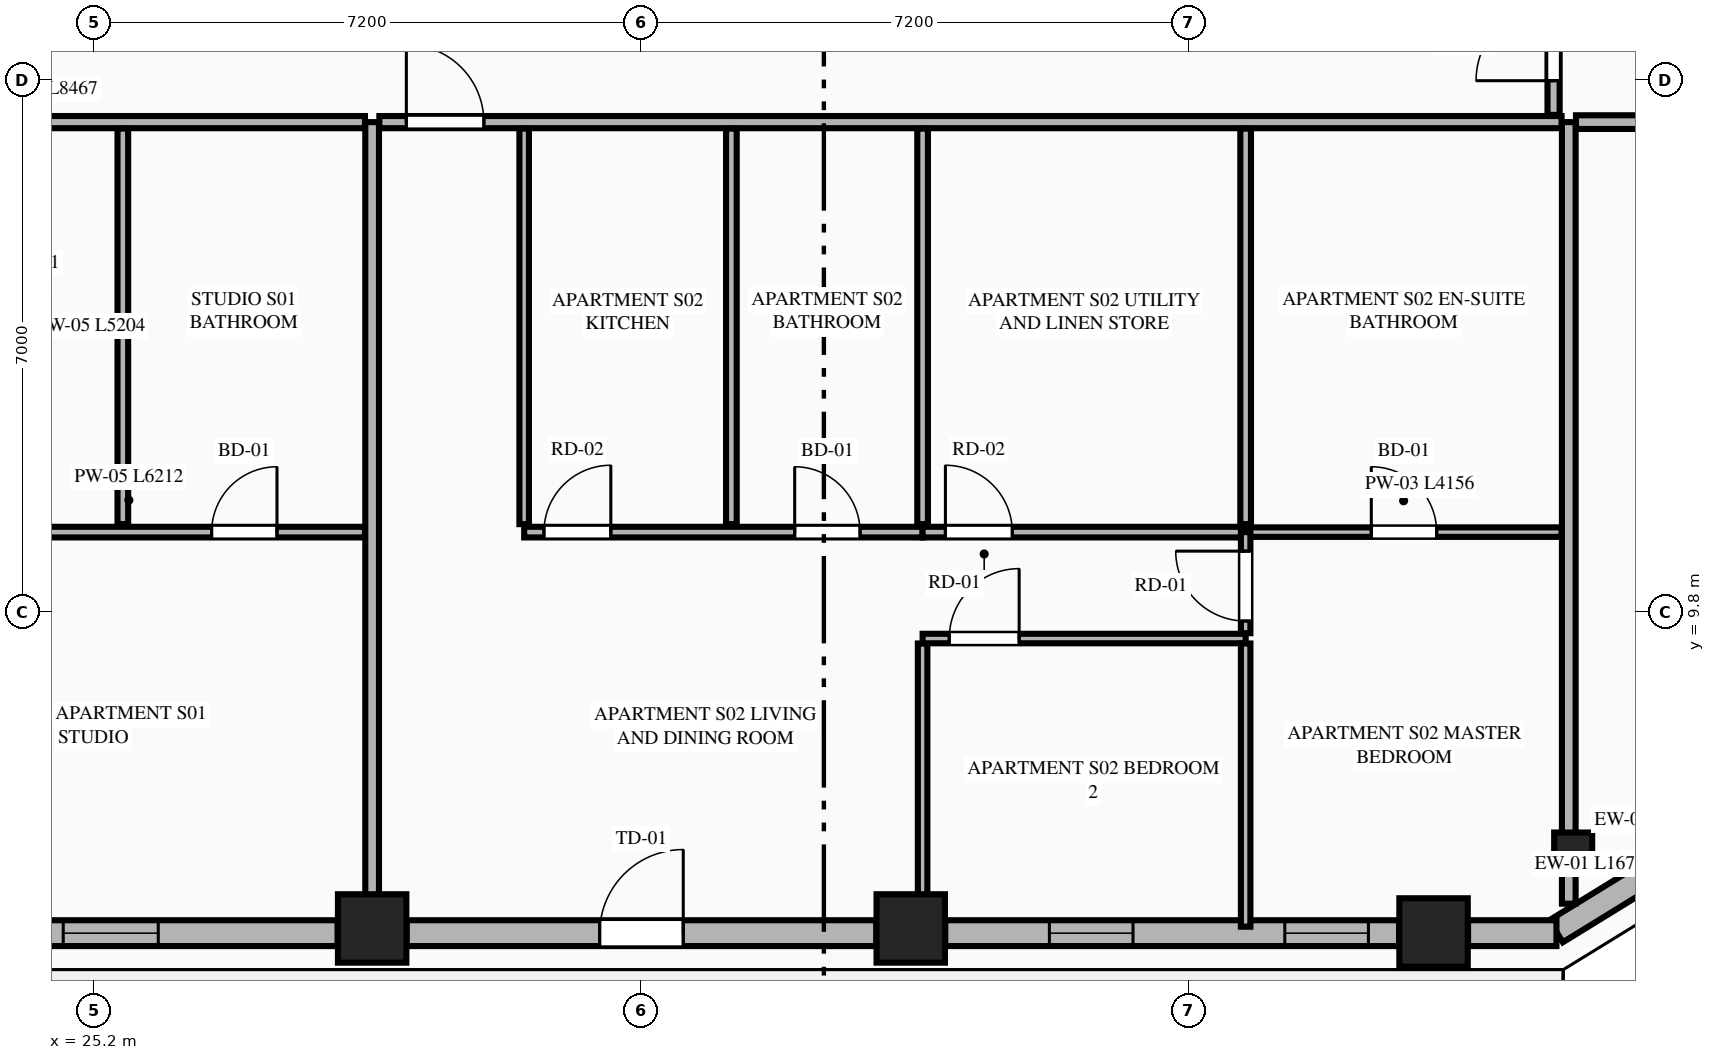
"""IFC4 building model, lengths in metres.
Left out: names, types, materials, properties, quantities, classifications, styles, units other than length and angle.
Written with IfcOpenShell. Run it as: python <this file> out.ifc"""

import sys

from ifc_helpers import new_model, si_unit, direction, frame, frame_2d, origin, origin_2d, place, context, subcontext, project, spatial, rectangle, extrude, element, fill, save


model = new_model("IFC4")
c1 = context("Model", 3, precision=1e-05, world=origin(), true_north=direction((0.0, 1.0)))
c2 = subcontext(c1, "Body", "Model", "MODEL_VIEW")
j1 = project(units=[si_unit("LENGTHUNIT", "METRE"), si_unit("PLANEANGLEUNIT", "RADIAN")], contexts=[c1])
p1 = place(None, origin())
s1 = spatial("IfcSite", under=j1, at=p1, CompositionType="ELEMENT")
p2 = place(p1, origin())
s2 = spatial("IfcBuilding", under=s1, at=p2, CompositionType="ELEMENT")
p3 = place(p2, frame((0.0, 0.0, 179.0)))
s3 = spatial("IfcBuildingStorey", under=s2, at=p3, CompositionType="ELEMENT", Elevation=179.0)
for number, where, z_axis, x_axis in (
    (1, (28.857, 5.642, 0.0), (0.0, 0.0, 1.0), (1.0, 0.0, 0.0)),
    (2, (35.943, 5.642, 0.0), (0.0, 0.0, 1.0), (1.0, 0.0, 0.0)),
    (3, (42.821, 5.589, 0.0), (0.0, 0.0, 1.0), (1.0, 0.0, 0.0)),
):
    element("IfcColumn", number, at=place(p3, frame(where, z_axis=z_axis, x_axis=x_axis)), inside=s3, PredefinedType="COLUMN", context=c2, shape_type="SweptSolid", body=[
        extrude(rectangle(XDim=0.9, YDim=0.9, at=origin_2d()), origin(), (0.0, 0.0, 1.0), 3.55),
    ])
p4 = place(p3, frame((44.658, 6.654, 0.0), z_axis=(0.0, 0.0, 1.0), x_axis=(0.865230187018, 0.501374833306, 0.0)))
e4 = element("IfcColumn", 4, at=p4, inside=s3, PredefinedType="PILASTER", context=c2, shape_type="SweptSolid", body=[
    extrude(rectangle(XDim=0.5, YDim=0.35, at=origin_2d()), origin(), (0.0, 0.0, 1.0), 3.55),
])
p5 = place(p3, frame((44.433, 5.605, 0.0), z_axis=(0.0, 0.0, 1.0), x_axis=(0.851778214877, 0.523902541185, 0.0)))
e5 = element("IfcWall", 5, at=p5, inside=s3, PredefinedType="STANDARD", context=c2, shape_type="SweptSolid", body=[
    extrude(rectangle(XDim=1.678, YDim=0.34, at=frame_2d((0.839, 0.0))), origin(), (0.0, 0.0, 1.0), 3.35),
])
p6 = place(p3, frame((22.433, 5.58, 0.0), z_axis=(0.0, 0.0, 1.0), x_axis=(1.0, 0.0, 0.0)))
e6 = element("IfcWall", 6, at=p6, inside=s3, PredefinedType="STANDARD", context=c2, shape_type="SweptSolid", body=[
    extrude(rectangle(XDim=5.97, YDim=0.34, at=frame_2d((2.985, 0.0))), origin(), (0.0, 0.0, 1.0), 2.883),
])
p7 = place(p6, frame((2.36, 0.0, 0.75)))
e7 = element("IfcOpeningElement", 7, at=p7, cuts=e6, PredefinedType="OPENING", context=c2, shape_type="SweptSolid", body=[
    extrude(rectangle(XDim=1.25, YDim=1.95, at=frame_2d((0.625, 0.975))), frame((0.0, 0.18, 0.0), z_axis=(0.0, -1.0, 0.0), x_axis=(1.0, 0.0, 0.0)), (0.0, 0.0, 1.0), 0.36),
])
p8 = place(p3, frame((29.311, 5.58, 0.0), z_axis=(0.0, 0.0, 1.0), x_axis=(1.0, 0.0, 0.0)))
e8 = element("IfcWall", 8, at=p8, inside=s3, PredefinedType="STANDARD", context=c2, shape_type="SweptSolid", body=[
    extrude(rectangle(XDim=6.178, YDim=0.34, at=frame_2d((3.089, 0.0))), origin(), (0.0, 0.0, 1.0), 2.883),
])
p9 = place(p8, frame((2.539, 0.0, 0.0)))
e9 = element("IfcOpeningElement", 9, at=p9, cuts=e8, PredefinedType="OPENING", context=c2, shape_type="SweptSolid", body=[
    extrude(rectangle(XDim=1.1, YDim=2.25, at=frame_2d((0.55, 1.125))), frame((0.0, 0.18, 0.0), z_axis=(0.0, -1.0, 0.0), x_axis=(1.0, 0.0, 0.0)), (0.0, 0.0, 1.0), 0.36),
])
p10 = place(p3, frame((36.397, 5.58, 0.0), z_axis=(0.0, 0.0, 1.0), x_axis=(1.0, 0.0, 0.0)))
e10 = element("IfcWall", 10, at=p10, inside=s3, PredefinedType="STANDARD", context=c2, shape_type="SweptSolid", body=[
    extrude(rectangle(XDim=5.97, YDim=0.34, at=frame_2d((2.985, 0.0))), origin(), (0.0, 0.0, 1.0), 2.883),
])
p11 = place(p10, frame((1.37, 0.0, 0.75)))
e11 = element("IfcOpeningElement", 11, at=p11, cuts=e10, PredefinedType="OPENING", context=c2, shape_type="SweptSolid", body=[
    extrude(rectangle(XDim=1.1, YDim=1.983, at=frame_2d((0.55, 0.991))), frame((0.0, 0.18, 0.0), z_axis=(0.0, -1.0, 0.0), x_axis=(1.0, 0.0, 0.0)), (0.0, 0.0, 1.0), 0.36),
])
p12 = place(p10, frame((4.467, 0.0, 0.75)))
e12 = element("IfcOpeningElement", 12, at=p12, cuts=e10, PredefinedType="OPENING", context=c2, shape_type="SweptSolid", body=[
    extrude(rectangle(XDim=1.1, YDim=1.983, at=frame_2d((0.55, 0.991))), frame((0.0, 0.18, 0.0), z_axis=(0.0, -1.0, 0.0), x_axis=(1.0, 0.0, 0.0)), (0.0, 0.0, 1.0), 0.36),
])
p13 = place(p3, frame((43.275, 5.58, 0.0), z_axis=(0.0, 0.0, 1.0), x_axis=(1.0, 0.0, 0.0)))
e13 = element("IfcWall", 13, at=p13, inside=s3, PredefinedType="STANDARD", context=c2, shape_type="SweptSolid", body=[
    extrude(rectangle(XDim=1.163, YDim=0.34, at=frame_2d((0.582, 0.0))), origin(), (0.0, 0.0, 1.0), 3.35),
])
p14 = place(p3, frame((28.857, 5.755, 0.0), z_axis=(0.0, 0.0, 1.0), x_axis=(0.0, 1.0, 0.0)))
e14 = element("IfcWall", 14, at=p14, inside=s3, PredefinedType="PARTITIONING", context=c2, shape_type="SweptSolid", body=[
    extrude(rectangle(XDim=10.495, YDim=0.18, at=frame_2d((5.248, 0.0))), origin(), (0.0, 0.0, 1.0), 2.807),
])
p15 = place(p3, frame((44.6, 5.968, 0.0), z_axis=(0.0, 0.0, 1.0), x_axis=(0.0, 1.0, 0.0)))
e15 = element("IfcWall", 15, at=p15, inside=s3, PredefinedType="PARTITIONING", context=c2, shape_type="SweptSolid", body=[
    extrude(rectangle(XDim=10.282, YDim=0.18, at=frame_2d((5.141, 0.0))), origin(), (0.0, 0.0, 1.0), 3.35),
])
p16 = place(p3, frame((20.295, 16.25, 0.0), z_axis=(0.0, 0.0, 1.0), x_axis=(1.0, 0.0, 0.0)))
e16 = element("IfcWall", 16, at=p16, inside=s3, PredefinedType="PARTITIONING", context=c2, shape_type="SweptSolid", body=[
    extrude(rectangle(XDim=8.467, YDim=0.16, at=frame_2d((4.233, 0.0))), origin(), (0.0, 0.0, 1.0), 3.35),
])
p17 = place(p16, frame((0.705, 0.0, 0.0)))
e17 = element("IfcOpeningElement", 17, at=p17, cuts=e16, PredefinedType="OPENING", context=c2, shape_type="SweptSolid", body=[
    extrude(rectangle(XDim=1.02, YDim=2.25, at=frame_2d((0.51, 1.125))), frame((0.0, 0.09, 0.0), z_axis=(0.0, -1.0, 0.0), x_axis=(1.0, 0.0, 0.0)), (0.0, 0.0, 1.0), 0.18),
])
p18 = place(p3, frame((22.55, 10.856, 0.0), z_axis=(0.0, 0.0, 1.0), x_axis=(1.0, 0.0, 0.0)))
e18 = element("IfcWall", 18, at=p18, inside=s3, PredefinedType="PLUMBINGWALL", context=c2, shape_type="SweptSolid", body=[
    extrude(rectangle(XDim=6.212, YDim=0.14, at=frame_2d((3.106, 0.0))), origin(), (0.0, 0.0, 1.0), 3.35),
])
p19 = place(p18, frame((4.195, 0.0, 0.0)))
e19 = element("IfcOpeningElement", 19, at=p19, cuts=e18, PredefinedType="OPENING", context=c2, shape_type="SweptSolid", body=[
    extrude(rectangle(XDim=0.86, YDim=2.1, at=frame_2d((0.43, 1.05))), frame((0.0, 0.08, 0.0), z_axis=(0.0, -1.0, 0.0), x_axis=(1.0, 0.0, 0.0)), (0.0, 0.0, 1.0), 0.16),
])
p20 = place(p18, frame((0.22, 0.0, 0.0)))
e20 = element("IfcOpeningElement", 20, at=p20, cuts=e18, PredefinedType="OPENING", context=c2, shape_type="SweptSolid", body=[
    extrude(rectangle(XDim=0.88, YDim=2.15, at=frame_2d((0.44, 1.075))), frame((0.0, 0.08, 0.0), z_axis=(0.0, -1.0, 0.0), x_axis=(1.0, 0.0, 0.0)), (0.0, 0.0, 1.0), 0.16),
])
p21 = place(p3, frame((25.577, 10.961, 0.0), z_axis=(0.0, 0.0, 1.0), x_axis=(0.0, 1.0, 0.0)))
e21 = element("IfcWall", 21, at=p21, inside=s3, PredefinedType="PLUMBINGWALL", context=c2, shape_type="SweptSolid", body=[
    extrude(rectangle(XDim=5.204, YDim=0.14, at=frame_2d((2.602, 0.0))), origin(), (0.0, 0.0, 1.0), 3.35),
])
p22 = place(p3, frame((28.952, 16.25, 0.0), z_axis=(0.0, 0.0, 1.0), x_axis=(1.0, 0.0, 0.0)))
e22 = element("IfcWall", 22, at=p22, inside=s3, PredefinedType="PARTITIONING", context=c2, shape_type="SweptSolid", body=[
    extrude(rectangle(XDim=15.553, YDim=0.16, at=frame_2d((7.776, 0.0))), origin(), (0.0, 0.0, 1.0), 3.35),
])
p23 = place(p22, frame((0.355, 0.0, 0.0)))
e23 = element("IfcOpeningElement", 23, at=p23, cuts=e22, PredefinedType="OPENING", context=c2, shape_type="SweptSolid", body=[
    extrude(rectangle(XDim=1.02, YDim=2.25, at=frame_2d((0.51, 1.125))), frame((0.0, 0.09, 0.0), z_axis=(0.0, -1.0, 0.0), x_axis=(1.0, 0.0, 0.0)), (0.0, 0.0, 1.0), 0.18),
])
p24 = place(p3, frame((30.857, 10.961, 0.0), z_axis=(0.0, 0.0, 1.0), x_axis=(0.0, 1.0, 0.0)))
e24 = element("IfcWall", 24, at=p24, inside=s3, PredefinedType="PARTITIONING", context=c2, shape_type="SweptSolid", body=[
    extrude(rectangle(XDim=5.204, YDim=0.125, at=frame_2d((2.602, 0.0))), origin(), (0.0, 0.0, 1.0), 3.35),
])
p25 = place(p3, frame((30.857, 10.856, 0.0), z_axis=(0.0, 0.0, 1.0), x_axis=(1.0, 0.0, 0.0)))
e25 = element("IfcWall", 25, at=p25, inside=s3, PredefinedType="PLUMBINGWALL", context=c2, shape_type="SweptSolid", body=[
    extrude(rectangle(XDim=5.242, YDim=0.14, at=frame_2d((2.621, 0.0))), origin(), (0.0, 0.0, 1.0), 3.35),
])
p26 = place(p25, frame((3.559, 0.0, 0.0)))
e26 = element("IfcOpeningElement", 26, at=p26, cuts=e25, PredefinedType="OPENING", context=c2, shape_type="SweptSolid", body=[
    extrude(rectangle(XDim=0.86, YDim=2.1, at=frame_2d((0.43, 1.05))), frame((0.0, 0.08, 0.0), z_axis=(0.0, -1.0, 0.0), x_axis=(1.0, 0.0, 0.0)), (0.0, 0.0, 1.0), 0.16),
])
p27 = place(p25, frame((0.26, 0.0, 0.0)))
e27 = element("IfcOpeningElement", 27, at=p27, cuts=e25, PredefinedType="OPENING", context=c2, shape_type="SweptSolid", body=[
    extrude(rectangle(XDim=0.88, YDim=2.15, at=frame_2d((0.44, 1.075))), frame((0.0, 0.08, 0.0), z_axis=(0.0, -1.0, 0.0), x_axis=(1.0, 0.0, 0.0)), (0.0, 0.0, 1.0), 0.16),
])
p28 = place(p3, frame((36.099, 10.856, 0.0), z_axis=(0.0, 0.0, 1.0), x_axis=(1.0, 0.0, 0.0)))
e28 = element("IfcWall", 28, at=p28, inside=s3, PredefinedType="PLUMBINGWALL", context=c2, shape_type="SweptSolid", body=[
    extrude(rectangle(XDim=4.25, YDim=0.14, at=frame_2d((2.125, 0.0))), origin(), (0.0, 0.0, 1.0), 3.35),
])
p29 = place(p28, frame((0.3, 0.0, 0.0)))
e29 = element("IfcOpeningElement", 29, at=p29, cuts=e28, PredefinedType="OPENING", context=c2, shape_type="SweptSolid", body=[
    extrude(rectangle(XDim=0.88, YDim=2.15, at=frame_2d((0.44, 1.075))), frame((0.0, 0.08, 0.0), z_axis=(0.0, -1.0, 0.0), x_axis=(1.0, 0.0, 0.0)), (0.0, 0.0, 1.0), 0.16),
])
p30 = place(p3, frame((40.349, 10.856, 0.0), z_axis=(0.0, 0.0, 1.0), x_axis=(1.0, 0.0, 0.0)))
e30 = element("IfcWall", 30, at=p30, inside=s3, PredefinedType="PARTITIONING", context=c2, shape_type="SweptSolid", body=[
    extrude(rectangle(XDim=4.156, YDim=0.125, at=frame_2d((2.078, 0.0))), origin(), (0.0, 0.0, 1.0), 3.35),
])
p31 = place(p30, frame((1.653, 0.0, 0.0)))
e31 = element("IfcOpeningElement", 31, at=p31, cuts=e30, PredefinedType="OPENING", context=c2, shape_type="SweptSolid", body=[
    extrude(rectangle(XDim=0.86, YDim=2.1, at=frame_2d((0.43, 1.05))), frame((0.0, 0.073, 0.0), z_axis=(0.0, -1.0, 0.0), x_axis=(1.0, 0.0, 0.0)), (0.0, 0.0, 1.0), 0.145),
])
p32 = place(p3, frame((33.583, 10.961, 0.0), z_axis=(0.0, 0.0, 1.0), x_axis=(0.0, 1.0, 0.0)))
e32 = element("IfcWall", 32, at=p32, inside=s3, PredefinedType="PLUMBINGWALL", context=c2, shape_type="SweptSolid", body=[
    extrude(rectangle(XDim=5.204, YDim=0.14, at=frame_2d((2.602, 0.0))), origin(), (0.0, 0.0, 1.0), 3.35),
])
p33 = place(p3, frame((36.099, 5.665, 0.0), z_axis=(0.0, 0.0, 1.0), x_axis=(0.0, 1.0, 0.0)))
e33 = element("IfcWall", 33, at=p33, inside=s3, PredefinedType="PARTITIONING", context=c2, shape_type="SweptSolid", body=[
    extrude(rectangle(XDim=3.726, YDim=0.125, at=frame_2d((1.863, 0.0))), origin(), (0.0, 0.0, 1.0), 3.35),
])
p34 = place(p3, frame((36.099, 9.456, 0.0), z_axis=(0.0, 0.0, 1.0), x_axis=(1.0, 0.0, 0.0)))
e34 = element("IfcWall", 34, at=p34, inside=s3, PredefinedType="PARTITIONING", context=c2, shape_type="SweptSolid", body=[
    extrude(rectangle(XDim=4.25, YDim=0.125, at=frame_2d((2.125, 0.0))), origin(), (0.0, 0.0, 1.0), 3.35),
])
p35 = place(p34, frame((0.35, 0.0, 0.0)))
e35 = element("IfcOpeningElement", 35, at=p35, cuts=e34, PredefinedType="OPENING", context=c2, shape_type="SweptSolid", body=[
    extrude(rectangle(XDim=0.92, YDim=2.15, at=frame_2d((0.46, 1.075))), frame((0.0, 0.073, 0.0), z_axis=(0.0, -1.0, 0.0), x_axis=(1.0, 0.0, 0.0)), (0.0, 0.0, 1.0), 0.145),
])
p36 = place(p3, frame((40.349, 9.526, 0.0), z_axis=(0.0, 0.0, 1.0), x_axis=(0.0, 1.0, 0.0)))
e36 = element("IfcWall", 36, at=p36, inside=s3, PredefinedType="PARTITIONING", context=c2, shape_type="SweptSolid", body=[
    extrude(rectangle(XDim=1.33, YDim=0.125, at=frame_2d((0.665, 0.0))), origin(), (0.0, 0.0, 1.0), 3.35),
])
p37 = place(p36, frame((0.16, 0.0, 0.0)))
e37 = element("IfcOpeningElement", 37, at=p37, cuts=e36, PredefinedType="OPENING", context=c2, shape_type="SweptSolid", body=[
    extrude(rectangle(XDim=0.92, YDim=2.15, at=frame_2d((0.46, 1.075))), frame((0.0, 0.073, 0.0), z_axis=(0.0, -1.0, 0.0), x_axis=(1.0, 0.0, 0.0)), (0.0, 0.0, 1.0), 0.145),
])
for number, where, z_axis, x_axis in (
    (38, (36.099, 10.961, 0.0), (0.0, 0.0, 1.0), (0.0, 1.0, 0.0)),
    (39, (40.349, 10.961, 0.0), (0.0, 0.0, 1.0), (0.0, 1.0, 0.0)),
):
    element("IfcWall", number, at=place(p3, frame(where, z_axis=z_axis, x_axis=x_axis)), inside=s3, PredefinedType="PLUMBINGWALL", context=c2, shape_type="SweptSolid", body=[
        extrude(rectangle(XDim=5.204, YDim=0.14, at=frame_2d((2.602, 0.0))), origin(), (0.0, 0.0, 1.0), 3.35),
    ])
p38 = place(p3, frame((40.349, 5.665, 0.0), z_axis=(0.0, 0.0, 1.0), x_axis=(0.0, 1.0, 0.0)))
e40 = element("IfcWall", 40, at=p38, inside=s3, PredefinedType="PARTITIONING", context=c2, shape_type="SweptSolid", body=[
    extrude(rectangle(XDim=3.726, YDim=0.125, at=frame_2d((1.863, 0.0))), origin(), (0.0, 0.0, 1.0), 3.35),
])
p39 = place(p3, frame((44.695, 16.25, 0.0), z_axis=(0.0, 0.0, 1.0), x_axis=(1.0, 0.0, 0.0)))
e41 = element("IfcWall", 41, at=p39, inside=s3, PredefinedType="PARTITIONING", context=c2, shape_type="SweptSolid", body=[
    extrude(rectangle(XDim=5.894, YDim=0.18, at=frame_2d((2.947, 0.0))), origin(), (0.0, 0.0, 1.0), 3.35),
])
p40 = place(p3, frame((44.4, 16.345, 0.0), z_axis=(0.0, 0.0, 1.0), x_axis=(0.0, 1.0, 0.0)))
e42 = element("IfcWall", 42, at=p40, inside=s3, PredefinedType="PARTITIONING", context=c2, shape_type="SweptSolid", body=[
    extrude(rectangle(XDim=18.71, YDim=0.16, at=frame_2d((9.355, 0.0))), origin(), (0.0, 0.0, 1.0), 3.35),
])
p41 = place(p40, frame((0.45, 0.0, 0.0)))
e43 = element("IfcOpeningElement", 43, at=p41, cuts=e42, PredefinedType="OPENING", context=c2, shape_type="SweptSolid", body=[
    extrude(rectangle(XDim=1.02, YDim=2.25, at=frame_2d((0.51, 1.125))), frame((0.0, 0.09, 0.0), z_axis=(0.0, -1.0, 0.0), x_axis=(1.0, 0.0, 0.0)), (0.0, 0.0, 1.0), 0.18),
])
p42 = place(p7, origin())
e44 = element("IfcWindow", 44, at=p42, inside=s3, PartitioningType="SINGLE_PANEL", PredefinedType="WINDOW", context=c2, shape_type="SweptSolid", body=[
    extrude(rectangle(XDim=1.25, YDim=1.95, at=frame_2d((0.625, 0.975))), frame((0.0, 0.03, 0.0), z_axis=(0.0, -1.0, 0.0), x_axis=(1.0, 0.0, 0.0)), (0.0, 0.0, 1.0), 0.06),
])
fill(e7, e44)
p43 = place(p9, origin())
e45 = element("IfcDoor", 45, at=p43, inside=s3, OperationType="SINGLE_SWING_RIGHT", PredefinedType="DOOR", context=c2, shape_type="SweptSolid", body=[
    extrude(rectangle(XDim=1.1, YDim=2.25, at=frame_2d((0.55, 1.125))), frame((0.0, 0.025, 0.0), z_axis=(0.0, -1.0, 0.0), x_axis=(1.0, 0.0, 0.0)), (0.0, 0.0, 1.0), 0.05),
])
fill(e9, e45)
p44 = place(p11, origin())
e46 = element("IfcWindow", 46, at=p44, inside=s3, PartitioningType="SINGLE_PANEL", PredefinedType="WINDOW", context=c2, shape_type="SweptSolid", body=[
    extrude(rectangle(XDim=1.1, YDim=1.983, at=frame_2d((0.55, 0.991))), frame((0.0, 0.03, 0.0), z_axis=(0.0, -1.0, 0.0), x_axis=(1.0, 0.0, 0.0)), (0.0, 0.0, 1.0), 0.06),
])
fill(e11, e46)
p45 = place(p19, origin())
e47 = element("IfcDoor", 47, at=p45, inside=s3, OperationType="SINGLE_SWING_RIGHT", PredefinedType="DOOR", context=c2, shape_type="SweptSolid", body=[
    extrude(rectangle(XDim=0.86, YDim=2.1, at=frame_2d((0.43, 1.05))), frame((0.0, 0.025, 0.0), z_axis=(0.0, -1.0, 0.0), x_axis=(1.0, 0.0, 0.0)), (0.0, 0.0, 1.0), 0.05),
])
fill(e19, e47)
p46 = place(p26, origin())
e48 = element("IfcDoor", 48, at=p46, inside=s3, OperationType="SINGLE_SWING_LEFT", PredefinedType="DOOR", context=c2, shape_type="SweptSolid", body=[
    extrude(rectangle(XDim=0.86, YDim=2.1, at=frame_2d((0.43, 1.05))), frame((0.0, 0.025, 0.0), z_axis=(0.0, -1.0, 0.0), x_axis=(1.0, 0.0, 0.0)), (0.0, 0.0, 1.0), 0.05),
])
fill(e26, e48)
p47 = place(p31, origin())
e49 = element("IfcDoor", 49, at=p47, inside=s3, OperationType="SINGLE_SWING_LEFT", PredefinedType="DOOR", context=c2, shape_type="SweptSolid", body=[
    extrude(rectangle(XDim=0.86, YDim=2.1, at=frame_2d((0.43, 1.05))), frame((0.0, 0.025, 0.0), z_axis=(0.0, -1.0, 0.0), x_axis=(1.0, 0.0, 0.0)), (0.0, 0.0, 1.0), 0.05),
])
fill(e31, e49)
p48 = place(p23, origin())
e50 = element("IfcDoor", 50, at=p48, inside=s3, OperationType="SINGLE_SWING_LEFT", PredefinedType="DOOR", context=c2, shape_type="SweptSolid", body=[
    extrude(rectangle(XDim=1.02, YDim=2.25, at=frame_2d((0.51, 1.125))), frame((0.0, 0.025, 0.0), z_axis=(0.0, -1.0, 0.0), x_axis=(1.0, 0.0, 0.0)), (0.0, 0.0, 1.0), 0.05),
])
fill(e23, e50)
p49 = place(p27, origin())
e51 = element("IfcDoor", 51, at=p49, inside=s3, OperationType="SINGLE_SWING_RIGHT", PredefinedType="DOOR", context=c2, shape_type="SweptSolid", body=[
    extrude(rectangle(XDim=0.88, YDim=2.15, at=frame_2d((0.44, 1.075))), frame((0.0, 0.025, 0.0), z_axis=(0.0, -1.0, 0.0), x_axis=(1.0, 0.0, 0.0)), (0.0, 0.0, 1.0), 0.05),
])
fill(e27, e51)
p50 = place(p29, origin())
e52 = element("IfcDoor", 52, at=p50, inside=s3, OperationType="SINGLE_SWING_LEFT", PredefinedType="DOOR", context=c2, shape_type="SweptSolid", body=[
    extrude(rectangle(XDim=0.88, YDim=2.15, at=frame_2d((0.44, 1.075))), frame((0.0, 0.025, 0.0), z_axis=(0.0, -1.0, 0.0), x_axis=(1.0, 0.0, 0.0)), (0.0, 0.0, 1.0), 0.05),
])
fill(e29, e52)
p51 = place(p35, origin())
e53 = element("IfcDoor", 53, at=p51, inside=s3, OperationType="SINGLE_SWING_RIGHT", PredefinedType="DOOR", context=c2, shape_type="SweptSolid", body=[
    extrude(rectangle(XDim=0.92, YDim=2.15, at=frame_2d((0.46, 1.075))), frame((0.0, 0.025, 0.0), z_axis=(0.0, -1.0, 0.0), x_axis=(1.0, 0.0, 0.0)), (0.0, 0.0, 1.0), 0.05),
])
fill(e35, e53)
p52 = place(p37, origin())
e54 = element("IfcDoor", 54, at=p52, inside=s3, OperationType="SINGLE_SWING_RIGHT", PredefinedType="DOOR", context=c2, shape_type="SweptSolid", body=[
    extrude(rectangle(XDim=0.92, YDim=2.15, at=frame_2d((0.46, 1.075))), frame((0.0, 0.025, 0.0), z_axis=(0.0, -1.0, 0.0), x_axis=(1.0, 0.0, 0.0)), (0.0, 0.0, 1.0), 0.05),
])
fill(e37, e54)
p53 = place(p41, origin())
e55 = element("IfcDoor", 55, at=p53, inside=s3, OperationType="SINGLE_SWING_LEFT", PredefinedType="DOOR", context=c2, shape_type="SweptSolid", body=[
    extrude(rectangle(XDim=1.02, YDim=2.25, at=frame_2d((0.51, 1.125))), frame((0.0, 0.025, 0.0), z_axis=(0.0, -1.0, 0.0), x_axis=(1.0, 0.0, 0.0)), (0.0, 0.0, 1.0), 0.05),
])
fill(e43, e55)
p54 = place(p12, origin())
e56 = element("IfcWindow", 56, at=p54, inside=s3, PartitioningType="SINGLE_PANEL", PredefinedType="WINDOW", context=c2, shape_type="SweptSolid", body=[
    extrude(rectangle(XDim=1.1, YDim=1.983, at=frame_2d((0.55, 0.991))), frame((0.0, 0.03, 0.0), z_axis=(0.0, -1.0, 0.0), x_axis=(1.0, 0.0, 0.0)), (0.0, 0.0, 1.0), 0.06),
])
fill(e12, e56)
save(model, sys.argv[1])
